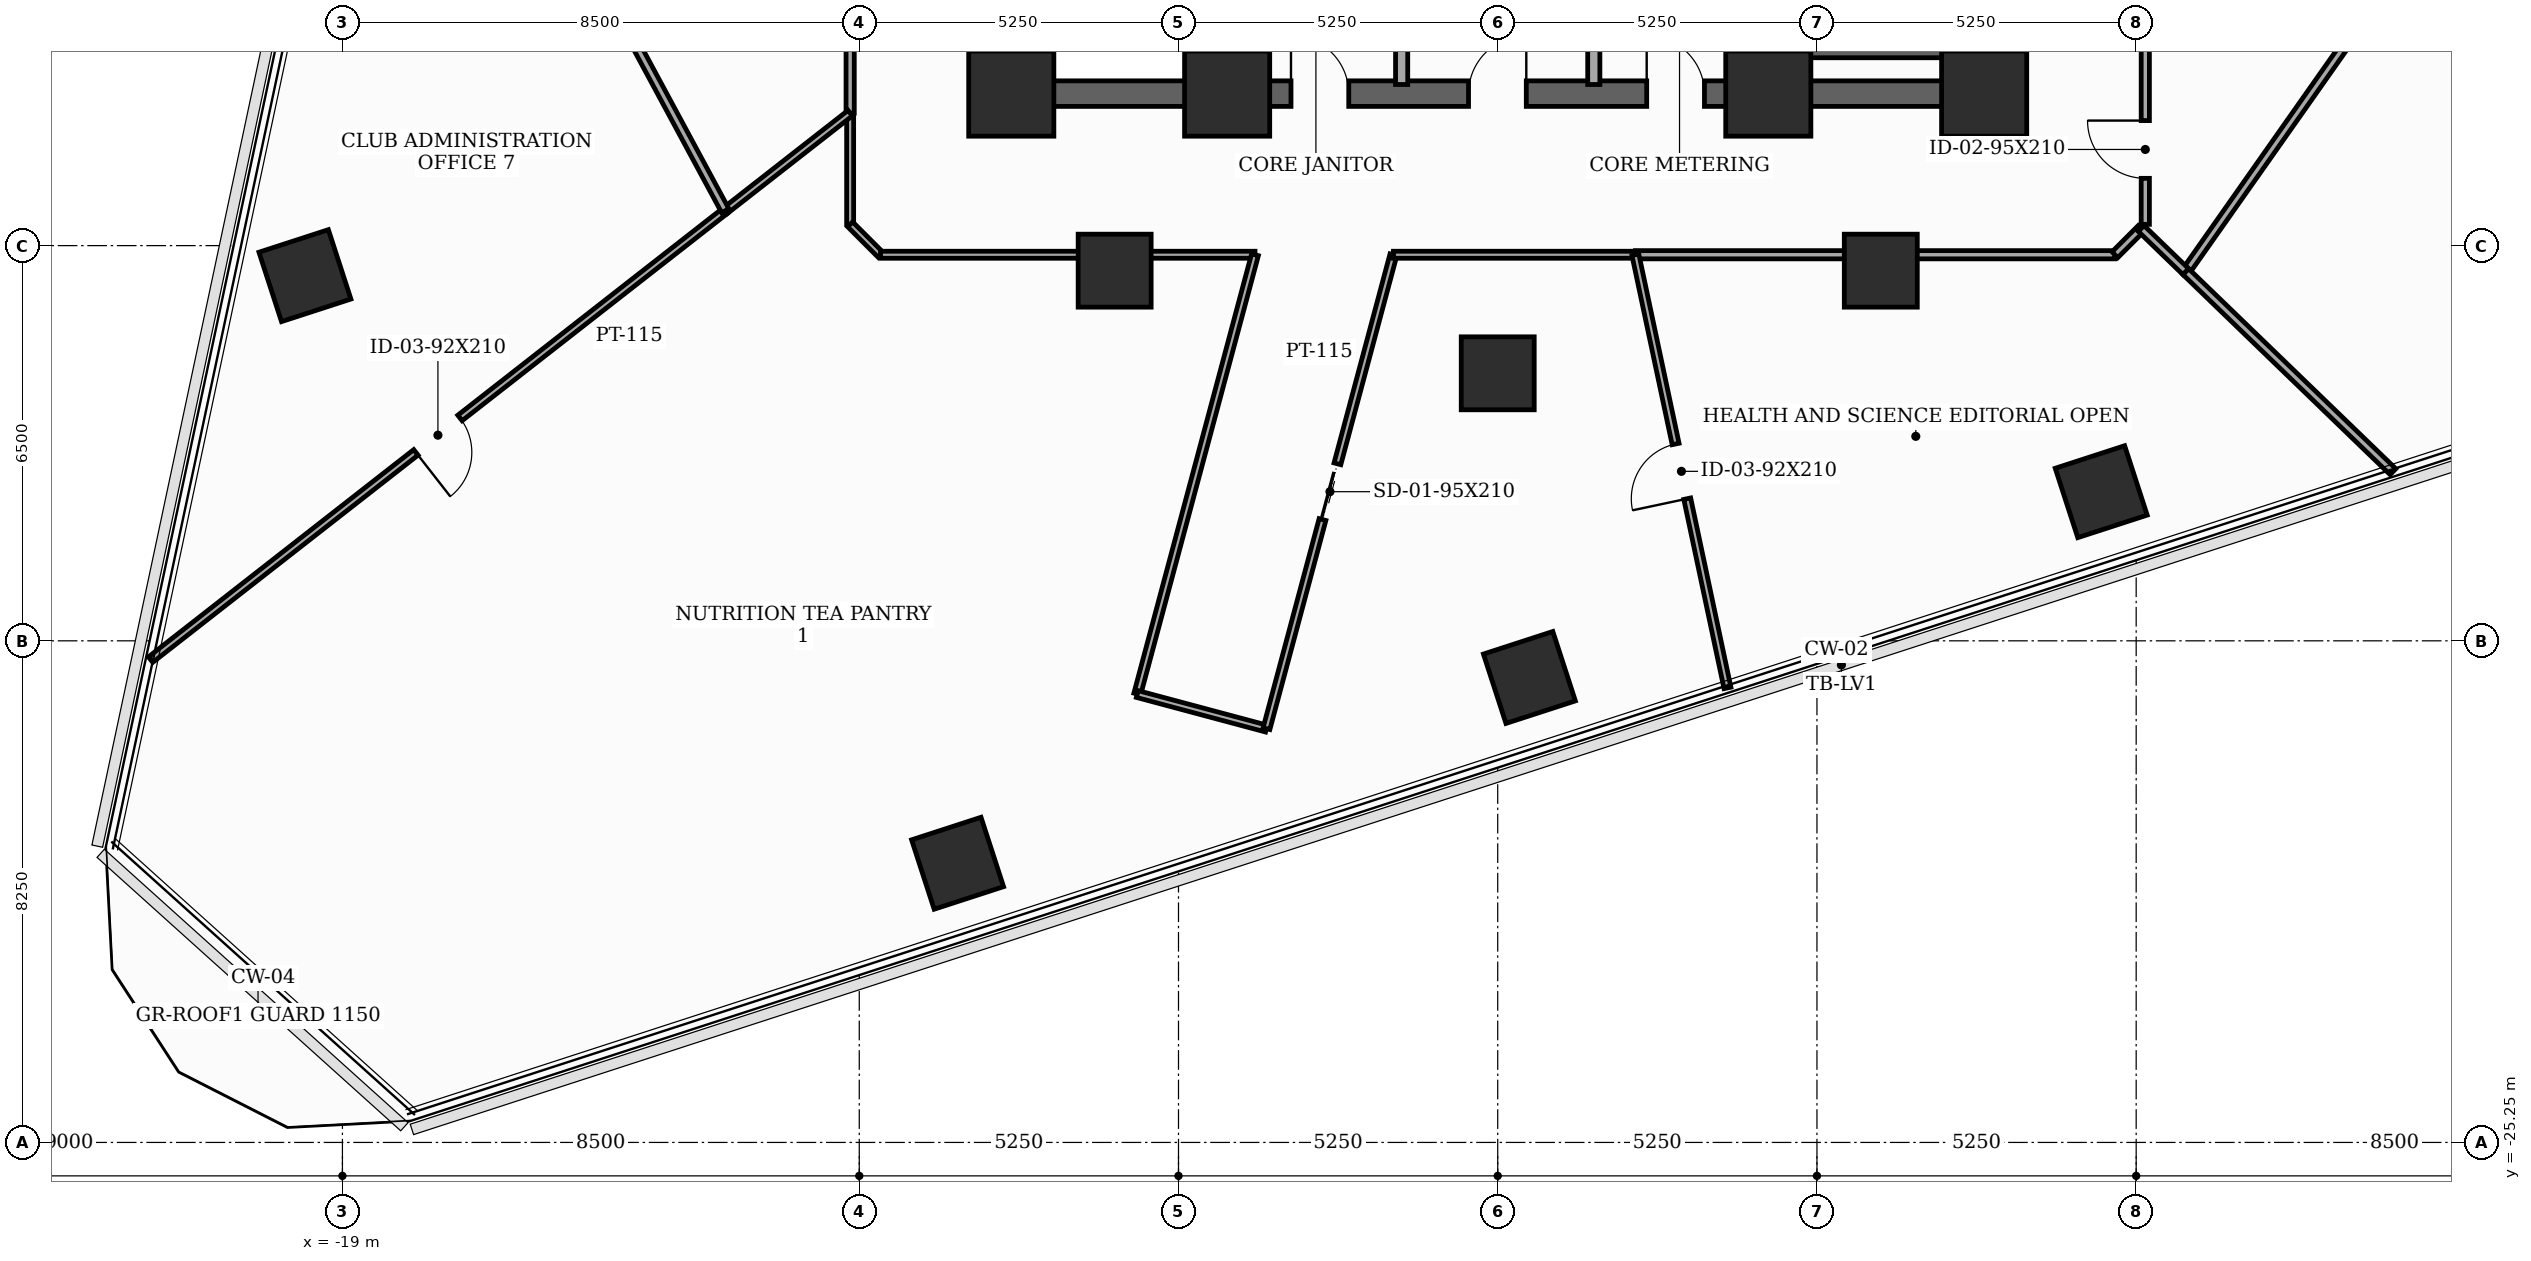
"""IFC4 building model, lengths in metres.
Left out: names, types, materials, properties, quantities, classifications, styles, units other than length and angle.
Written with IfcOpenShell. Run it as: python <this file> out.ifc"""

import sys

from ifc_helpers import new_model, si_unit, direction, frame, frame_2d, origin, origin_2d, place, context, subcontext, project, spatial, rectangle, extrude, element, fill, save


model = new_model("IFC4")
c1 = context("Model", 3, precision=1e-05, world=origin(), true_north=direction((0.0, 1.0)))
c2 = subcontext(c1, "Body", "Model", "MODEL_VIEW")
j1 = project(units=[si_unit("LENGTHUNIT", "METRE"), si_unit("PLANEANGLEUNIT", "RADIAN")], contexts=[c1])
p1 = place(None, origin())
s1 = spatial("IfcSite", under=j1, at=p1, CompositionType="ELEMENT")
p2 = place(p1, origin())
s2 = spatial("IfcBuilding", under=s1, at=p2, CompositionType="ELEMENT")
p3 = place(p2, frame((0.0, 0.0, 108.8)))
s3 = spatial("IfcBuildingStorey", under=s2, at=p3, CompositionType="ELEMENT", Elevation=108.8)
for number, where, z_axis, x_axis in (
    (1, (-8.0, -8.0, 0.0), (0.0, 0.0, 1.0), (1.0, 0.0, 0.0)),
    (2, (-4.45, -8.0, 0.0), (0.0, 0.0, 1.0), (1.0, 0.0, 0.0)),
    (3, (4.45, -8.0, 0.0), (0.0, 0.0, 1.0), (1.0, 0.0, 0.0)),
    (4, (8.0, -8.0, 0.0), (0.0, 0.0, 1.0), (1.0, 0.0, 0.0)),
):
    element("IfcColumn", number, at=place(p3, frame(where, z_axis=z_axis, x_axis=x_axis)), inside=s3, PredefinedType="COLUMN", context=c2, shape_type="SweptSolid", body=[
        extrude(rectangle(XDim=1.4, YDim=1.4, at=origin_2d()), origin(), (0.0, 0.0, 1.0), 3.7),
    ])
for number, where, z_axis, x_axis in (
    (5, (-6.3, -10.912, 0.0), (0.0, 0.0, 1.0), (1.0, 0.0, 0.0)),
    (6, (0.0, -12.6, 0.0), (0.0, 0.0, 1.0), (1.0, 0.0, 0.0)),
    (7, (6.3, -10.912, 0.0), (0.0, 0.0, 1.0), (1.0, 0.0, 0.0)),
    (8, (-8.883, -20.658, 0.0), (0.0, 0.0, 1.0), (0.951, 0.309, 0.0)),
    (9, (0.521, -17.603, 0.0), (0.0, 0.0, 1.0), (0.951, 0.309, 0.0)),
    (10, (9.925, -14.547, 0.0), (0.0, 0.0, 1.0), (0.951, 0.309, 0.0)),
    (11, (-19.616, -10.994, 0.0), (0.0, 0.0, 1.0), (0.951, 0.309, 0.0)),
):
    element("IfcColumn", number, at=place(p3, frame(where, z_axis=z_axis, x_axis=x_axis)), inside=s3, PredefinedType="COLUMN", context=c2, shape_type="SweptSolid", body=[
        extrude(rectangle(XDim=1.2, YDim=1.2, at=origin_2d()), origin(), (0.0, 0.0, 1.0), 3.7),
    ])
p4 = place(p3, frame((-8.0, -8.0, 0.0), z_axis=(0.0, 0.0, 1.0), x_axis=(0.0, 1.0, 0.0)))
e12 = element("IfcWall", 12, at=p4, inside=s3, PredefinedType="SHEAR", context=c2, shape_type="SweptSolid", body=[
    extrude(rectangle(XDim=16.0, YDim=0.42, at=frame_2d((8.0, 0.0))), origin(), (0.0, 0.0, 1.0), 3.5),
])
p5 = place(p4, frame((0.922, 0.0, 0.0)))
e13 = element("IfcOpeningElement", 13, at=p5, cuts=e12, PredefinedType="OPENING", context=c2, shape_type="SweptSolid", body=[
    extrude(rectangle(XDim=0.85, YDim=2.02, at=frame_2d((0.425, 1.01))), frame((0.0, 0.22, 0.0), z_axis=(0.0, -1.0, 0.0), x_axis=(1.0, 0.0, 0.0)), (0.0, 0.0, 1.0), 0.44),
])
p6 = place(p4, frame((5.35, 0.0, 0.0)))
e14 = element("IfcOpeningElement", 14, at=p6, cuts=e12, PredefinedType="OPENING", context=c2, shape_type="SweptSolid", body=[
    extrude(rectangle(XDim=1.05, YDim=2.15, at=frame_2d((0.525, 1.075))), frame((0.0, 0.22, 0.0), z_axis=(0.0, -1.0, 0.0), x_axis=(1.0, 0.0, 0.0)), (0.0, 0.0, 1.0), 0.44),
])
p7 = place(p3, frame((8.0, -8.0, 0.0), z_axis=(0.0, 0.0, 1.0), x_axis=(0.0, 1.0, 0.0)))
e15 = element("IfcWall", 15, at=p7, inside=s3, PredefinedType="SHEAR", context=c2, shape_type="SweptSolid", body=[
    extrude(rectangle(XDim=16.0, YDim=0.42, at=frame_2d((8.0, 0.0))), origin(), (0.0, 0.0, 1.0), 3.5),
])
p8 = place(p7, frame((9.6, 0.0, 0.0)))
e16 = element("IfcOpeningElement", 16, at=p8, cuts=e15, PredefinedType="OPENING", context=c2, shape_type="SweptSolid", body=[
    extrude(rectangle(XDim=1.05, YDim=2.15, at=frame_2d((0.525, 1.075))), frame((0.0, 0.22, 0.0), z_axis=(0.0, -1.0, 0.0), x_axis=(1.0, 0.0, 0.0)), (0.0, 0.0, 1.0), 0.44),
])
p9 = place(p7, frame((14.229, 0.0, 0.0)))
e17 = element("IfcOpeningElement", 17, at=p9, cuts=e15, PredefinedType="OPENING", context=c2, shape_type="SweptSolid", body=[
    extrude(rectangle(XDim=0.85, YDim=2.02, at=frame_2d((0.425, 1.01))), frame((0.0, 0.22, 0.0), z_axis=(0.0, -1.0, 0.0), x_axis=(1.0, 0.0, 0.0)), (0.0, 0.0, 1.0), 0.44),
])
p10 = place(p3, frame((-8.0, -8.0, 0.0), z_axis=(0.0, 0.0, 1.0), x_axis=(1.0, 0.0, 0.0)))
e18 = element("IfcWall", 18, at=p10, inside=s3, PredefinedType="SHEAR", context=c2, shape_type="SweptSolid", body=[
    extrude(rectangle(XDim=16.0, YDim=0.42, at=frame_2d((8.0, 0.0))), origin(), (0.0, 0.0, 1.0), 3.5),
])
p11 = place(p10, frame((4.6, 0.0, 0.0)))
e19 = element("IfcOpeningElement", 19, at=p11, cuts=e18, PredefinedType="OPENING", context=c2, shape_type="SweptSolid", body=[
    extrude(rectangle(XDim=0.95, YDim=2.1, at=frame_2d((0.475, 1.05))), frame((0.0, 0.22, 0.0), z_axis=(0.0, -1.0, 0.0), x_axis=(1.0, 0.0, 0.0)), (0.0, 0.0, 1.0), 0.44),
])
p12 = place(p10, frame((7.52, 0.0, 0.0)))
e20 = element("IfcOpeningElement", 20, at=p12, cuts=e18, PredefinedType="OPENING", context=c2, shape_type="SweptSolid", body=[
    extrude(rectangle(XDim=0.95, YDim=2.1, at=frame_2d((0.475, 1.05))), frame((0.0, 0.22, 0.0), z_axis=(0.0, -1.0, 0.0), x_axis=(1.0, 0.0, 0.0)), (0.0, 0.0, 1.0), 0.44),
])
p13 = place(p10, frame((10.45, 0.0, 0.0)))
e21 = element("IfcOpeningElement", 21, at=p13, cuts=e18, PredefinedType="OPENING", context=c2, shape_type="SweptSolid", body=[
    extrude(rectangle(XDim=0.95, YDim=2.1, at=frame_2d((0.475, 1.05))), frame((0.0, 0.22, 0.0), z_axis=(0.0, -1.0, 0.0), x_axis=(1.0, 0.0, 0.0)), (0.0, 0.0, 1.0), 0.44),
])
for number, where, z_axis, x_axis in (
    (22, (-4.45, -7.79, 0.0), (0.0, 0.0, 1.0), (0.0, 1.0, 0.0)),
    (23, (4.45, -7.79, 0.0), (0.0, 0.0, 1.0), (0.0, 1.0, 0.0)),
):
    element("IfcWall", number, at=place(p3, frame(where, z_axis=z_axis, x_axis=x_axis)), inside=s3, PredefinedType="SHEAR", context=c2, shape_type="SweptSolid", body=[
        extrude(rectangle(XDim=15.58, YDim=0.3, at=frame_2d((7.79, 0.0))), origin(), (0.0, 0.0, 1.0), 3.5),
    ])
p14 = place(p3, frame((4.45, -7.26, 0.0), z_axis=(0.0, 0.0, 1.0), x_axis=(1.0, 0.0, 0.0)))
e24 = element("IfcWall", 24, at=p14, inside=s3, PredefinedType="SHEAR", context=c2, shape_type="SweptSolid", body=[
    extrude(rectangle(XDim=3.55, YDim=0.3, at=frame_2d((1.775, 0.0))), origin(), (0.0, 0.0, 1.0), 3.5),
])
for number, where, z_axis, x_axis in (
    (25, (-1.58, -7.85, 0.0), (0.0, 0.0, 1.0), (0.0, 1.0, 0.0)),
    (26, (1.58, -7.85, 0.0), (0.0, 0.0, 1.0), (0.0, 1.0, 0.0)),
):
    element("IfcWall", number, at=place(p3, frame(where, z_axis=z_axis, x_axis=x_axis)), inside=s3, PredefinedType="SOLIDWALL", context=c2, shape_type="SweptSolid", body=[
        extrude(rectangle(XDim=2.95, YDim=0.2, at=frame_2d((1.475, 0.0))), origin(), (0.0, 0.0, 1.0), 2.885),
    ])
p15 = place(p3, frame((-10.65, -8.321, 0.0), z_axis=(0.0, 0.0, 1.0), x_axis=(0.0, -1.0, 0.0)))
e27 = element("IfcWall", 27, at=p15, inside=s3, PredefinedType="PARTITIONING", context=c2, shape_type="SweptSolid", body=[
    extrude(rectangle(XDim=1.829, YDim=0.115, at=frame_2d((0.915, 0.0))), origin(), (0.0, 0.0, 1.0), 3.5),
])
p16 = place(p3, frame((-10.65, -10.15, 0.0), z_axis=(0.0, 0.0, 1.0), x_axis=(0.707106781187, -0.707106781187, 0.0)))
e28 = element("IfcWall", 28, at=p16, inside=s3, PredefinedType="PARTITIONING", context=c2, shape_type="SweptSolid", body=[
    extrude(rectangle(XDim=0.707, YDim=0.115, at=frame_2d((0.354, 0.0))), origin(), (0.0, 0.0, 1.0), 3.5),
])
p17 = place(p3, frame((-10.15, -10.65, 0.0), z_axis=(0.0, 0.0, 1.0), x_axis=(1.0, 0.0, 0.0)))
e29 = element("IfcWall", 29, at=p17, inside=s3, PredefinedType="PARTITIONING", context=c2, shape_type="SweptSolid", body=[
    extrude(rectangle(XDim=6.158, YDim=0.115, at=frame_2d((3.079, 0.0))), origin(), (0.0, 0.0, 1.0), 2.785),
])
p18 = place(p3, frame((-3.992, -10.65, 0.0), z_axis=(0.0, 0.0, 1.0), x_axis=(-0.258828534142, -0.965923283659, 0.0)))
e30 = element("IfcWall", 30, at=p18, inside=s3, PredefinedType="PARTITIONING", context=c2, shape_type="SweptSolid", body=[
    extrude(rectangle(XDim=7.48, YDim=0.115, at=frame_2d((3.74, 0.0))), origin(), (0.0, 0.0, 1.0), 2.785),
])
p19 = place(p3, frame((-5.928, -17.875, 0.0), z_axis=(0.0, 0.0, 1.0), x_axis=(0.965959937537, -0.258691706618, 0.0)))
e31 = element("IfcWall", 31, at=p19, inside=s3, PredefinedType="PARTITIONING", context=c2, shape_type="SweptSolid", body=[
    extrude(rectangle(XDim=2.2, YDim=0.115, at=frame_2d((1.1, 0.0))), origin(), (0.0, 0.0, 1.0), 3.5),
])
p20 = place(p3, frame((-3.803, -18.444, 0.0), z_axis=(0.0, 0.0, 1.0), x_axis=(0.258754737882, 0.965943055062, 0.0)))
e32 = element("IfcWall", 32, at=p20, inside=s3, PredefinedType="PARTITIONING", context=c2, shape_type="SweptSolid", body=[
    extrude(rectangle(XDim=8.069, YDim=0.115, at=frame_2d((4.035, 0.0))), origin(), (0.0, 0.0, 1.0), 2.785),
])
p21 = place(p20, frame((3.559, 0.0, 0.0)))
e33 = element("IfcOpeningElement", 33, at=p21, cuts=e32, PredefinedType="OPENING", context=c2, shape_type="SweptSolid", body=[
    extrude(rectangle(XDim=0.95, YDim=2.1, at=frame_2d((0.475, 1.05))), frame((0.0, 0.067, 0.0), z_axis=(0.0, -1.0, 0.0), x_axis=(1.0, 0.0, 0.0)), (0.0, 0.0, 1.0), 0.135),
])
p22 = place(p3, frame((-1.715, -10.65, 0.0), z_axis=(0.0, 0.0, 1.0), x_axis=(1.0, 0.0, 0.0)))
e34 = element("IfcWall", 34, at=p22, inside=s3, PredefinedType="PARTITIONING", context=c2, shape_type="SweptSolid", body=[
    extrude(rectangle(XDim=3.979, YDim=0.115, at=frame_2d((1.99, 0.0))), origin(), (0.0, 0.0, 1.0), 2.785),
])
p23 = place(p3, frame((10.65, -10.15, 0.0), z_axis=(0.0, 0.0, 1.0), x_axis=(0.0, 1.0, 0.0)))
e35 = element("IfcWall", 35, at=p23, inside=s3, PredefinedType="PARTITIONING", context=c2, shape_type="SweptSolid", body=[
    extrude(rectangle(XDim=6.158, YDim=0.135, at=frame_2d((3.079, 0.0))), origin(), (0.0, 0.0, 1.0), 2.785),
])
p24 = place(p23, frame((0.757, 0.0, 0.0)))
e36 = element("IfcOpeningElement", 36, at=p24, cuts=e35, PredefinedType="OPENING", context=c2, shape_type="SweptSolid", body=[
    extrude(rectangle(XDim=0.95, YDim=2.1, at=frame_2d((0.475, 1.05))), frame((0.0, 0.077, 0.0), z_axis=(0.0, -1.0, 0.0), x_axis=(1.0, 0.0, 0.0)), (0.0, 0.0, 1.0), 0.155),
])
p25 = place(p3, frame((-10.65, -4.85, 0.0), z_axis=(0.0, 0.0, 1.0), x_axis=(0.0, -1.0, 0.0)))
e37 = element("IfcWall", 37, at=p25, inside=s3, PredefinedType="PARTITIONING", context=c2, shape_type="SweptSolid", body=[
    extrude(rectangle(XDim=3.471, YDim=0.135, at=frame_2d((1.735, 0.0))), origin(), (0.0, 0.0, 1.0), 2.785),
])
p26 = place(p3, frame((2.264, -10.65, 0.0), z_axis=(0.0, 0.0, 1.0), x_axis=(1.0, 0.0, 0.0)))
e38 = element("IfcWall", 38, at=p26, inside=s3, PredefinedType="PARTITIONING", context=c2, shape_type="SweptSolid", body=[
    extrude(rectangle(XDim=7.886, YDim=0.135, at=frame_2d((3.943, 0.0))), origin(), (0.0, 0.0, 1.0), 2.785),
])
p27 = place(p3, frame((10.15, -10.65, 0.0), z_axis=(0.0, 0.0, 1.0), x_axis=(0.70730655707, 0.706906948845, 0.0)))
e39 = element("IfcWall", 39, at=p27, inside=s3, PredefinedType="PARTITIONING", context=c2, shape_type="SweptSolid", body=[
    extrude(rectangle(XDim=0.611, YDim=0.135, at=frame_2d((0.305, 0.0))), origin(), (0.0, 0.0, 1.0), 3.5),
])
p28 = place(p3, frame((-10.65, -8.321, 0.0), z_axis=(0.0, 0.0, 1.0), x_axis=(-0.787998815749, -0.615676754782, 0.0)))
e40 = element("IfcWall", 40, at=p28, inside=s3, PredefinedType="PARTITIONING", context=c2, shape_type="SweptSolid", body=[
    extrude(rectangle(XDim=2.607, YDim=0.115, at=frame_2d((1.303, 0.0))), origin(), (0.0, 0.0, 1.0), 3.5),
])
p29 = place(p3, frame((-12.704, -9.926, 0.0), z_axis=(0.0, 0.0, 1.0), x_axis=(-0.788033940978, -0.615631795692, 0.0)))
e41 = element("IfcWall", 41, at=p29, inside=s3, PredefinedType="PARTITIONING", context=c2, shape_type="SweptSolid", body=[
    extrude(rectangle(XDim=11.993, YDim=0.115, at=frame_2d((5.997, 0.0))), origin(), (0.0, 0.0, 1.0), 2.935),
])
p30 = place(p29, frame((5.537, 0.0, 0.0)))
e42 = element("IfcOpeningElement", 42, at=p30, cuts=e41, PredefinedType="OPENING", context=c2, shape_type="SweptSolid", body=[
    extrude(rectangle(XDim=0.92, YDim=2.1, at=frame_2d((0.46, 1.05))), frame((0.0, 0.067, 0.0), z_axis=(0.0, -1.0, 0.0), x_axis=(1.0, 0.0, 0.0)), (0.0, 0.0, 1.0), 0.135),
])
p31 = place(p3, frame((3.778, -17.774, 0.0), z_axis=(0.0, 0.0, 1.0), x_axis=(-0.207917284361, 0.978146411773, 0.0)))
e43 = element("IfcWall", 43, at=p31, inside=s3, PredefinedType="PARTITIONING", context=c2, shape_type="SweptSolid", body=[
    extrude(rectangle(XDim=7.284, YDim=0.115, at=frame_2d((3.642, 0.0))), origin(), (0.0, 0.0, 1.0), 2.785),
])
p32 = place(p31, frame((3.182, 0.0, 0.0)))
e44 = element("IfcOpeningElement", 44, at=p32, cuts=e43, PredefinedType="OPENING", context=c2, shape_type="SweptSolid", body=[
    extrude(rectangle(XDim=0.92, YDim=2.1, at=frame_2d((0.46, 1.05))), frame((0.0, 0.067, 0.0), z_axis=(0.0, -1.0, 0.0), x_axis=(1.0, 0.0, 0.0)), (0.0, 0.0, 1.0), 0.135),
])
p33 = place(p3, frame((14.349, -6.615, 0.0), z_axis=(0.0, 0.0, 1.0), x_axis=(-0.575468172254, -0.817824175922, 0.0)))
e45 = element("IfcWall", 45, at=p33, inside=s3, PredefinedType="PARTITIONING", context=c2, shape_type="SweptSolid", body=[
    extrude(rectangle(XDim=5.272, YDim=0.135, at=frame_2d((2.636, 0.0))), origin(), (0.0, 0.0, 1.0), 2.785),
])
p34 = place(p3, frame((11.315, -10.927, 0.0), z_axis=(0.0, 0.0, 1.0), x_axis=(0.719365057957, -0.694632214478, 0.0)))
e46 = element("IfcWall", 46, at=p34, inside=s3, PredefinedType="PARTITIONING", context=c2, shape_type="SweptSolid", body=[
    extrude(rectangle(XDim=4.738, YDim=0.135, at=frame_2d((2.369, 0.0))), origin(), (0.0, 0.0, 1.0), 2.935),
])
p35 = place(p3, frame((10.582, -10.218, 0.0), z_axis=(0.0, 0.0, 1.0), x_axis=(0.718741071219, -0.695277838381, 0.0)))
e47 = element("IfcWall", 47, at=p35, inside=s3, PredefinedType="PARTITIONING", context=c2, shape_type="SweptSolid", body=[
    extrude(rectangle(XDim=1.02, YDim=0.135, at=frame_2d((0.51, 0.0))), origin(), (0.0, 0.0, 1.0), 3.5),
])
p36 = place(p3, frame((-15.478, -4.781, 0.0), z_axis=(0.0, 0.0, 1.0), x_axis=(0.47456801742, -0.880218834633, 0.0)))
e48 = element("IfcWall", 48, at=p36, inside=s3, PredefinedType="PARTITIONING", context=c2, shape_type="SweptSolid", body=[
    extrude(rectangle(XDim=5.845, YDim=0.135, at=frame_2d((2.923, 0.0))), origin(), (0.0, 0.0, 1.0), 2.785),
])
p37 = place(p11, origin())
e49 = element("IfcDoor", 49, at=p37, inside=s3, OperationType="SINGLE_SWING_LEFT", PredefinedType="DOOR", context=c2, shape_type="SweptSolid", body=[
    extrude(rectangle(XDim=0.95, YDim=2.1, at=frame_2d((0.475, 1.05))), frame((0.0, 0.025, 0.0), z_axis=(0.0, -1.0, 0.0), x_axis=(1.0, 0.0, 0.0)), (0.0, 0.0, 1.0), 0.05),
])
fill(e19, e49)
p38 = place(p12, origin())
e50 = element("IfcDoor", 50, at=p38, inside=s3, OperationType="SINGLE_SWING_RIGHT", PredefinedType="DOOR", context=c2, shape_type="SweptSolid", body=[
    extrude(rectangle(XDim=0.95, YDim=2.1, at=frame_2d((0.475, 1.05))), frame((0.0, 0.025, 0.0), z_axis=(0.0, -1.0, 0.0), x_axis=(1.0, 0.0, 0.0)), (0.0, 0.0, 1.0), 0.05),
])
fill(e20, e50)
p39 = place(p13, origin())
e51 = element("IfcDoor", 51, at=p39, inside=s3, OperationType="SINGLE_SWING_LEFT", PredefinedType="DOOR", context=c2, shape_type="SweptSolid", body=[
    extrude(rectangle(XDim=0.95, YDim=2.1, at=frame_2d((0.475, 1.05))), frame((0.0, 0.025, 0.0), z_axis=(0.0, -1.0, 0.0), x_axis=(1.0, 0.0, 0.0)), (0.0, 0.0, 1.0), 0.05),
])
fill(e21, e51)
p40 = place(p21, origin())
e52 = element("IfcDoor", 52, at=p40, inside=s3, OperationType="SLIDING_TO_LEFT", PredefinedType="DOOR", context=c2, shape_type="SweptSolid", body=[
    extrude(rectangle(XDim=0.95, YDim=2.1, at=frame_2d((0.475, 1.05))), frame((0.0, 0.025, 0.0), z_axis=(0.0, -1.0, 0.0), x_axis=(1.0, 0.0, 0.0)), (0.0, 0.0, 1.0), 0.05),
])
fill(e33, e52)
p41 = place(p24, origin())
e53 = element("IfcDoor", 53, at=p41, inside=s3, OperationType="SINGLE_SWING_RIGHT", PredefinedType="DOOR", context=c2, shape_type="SweptSolid", body=[
    extrude(rectangle(XDim=0.95, YDim=2.1, at=frame_2d((0.475, 1.05))), frame((0.0, 0.025, 0.0), z_axis=(0.0, -1.0, 0.0), x_axis=(1.0, 0.0, 0.0)), (0.0, 0.0, 1.0), 0.05),
])
fill(e36, e53)
p42 = place(p30, origin())
e54 = element("IfcDoor", 54, at=p42, inside=s3, OperationType="SINGLE_SWING_RIGHT", PredefinedType="DOOR", context=c2, shape_type="SweptSolid", body=[
    extrude(rectangle(XDim=0.92, YDim=2.1, at=frame_2d((0.46, 1.05))), frame((0.0, 0.025, 0.0), z_axis=(0.0, -1.0, 0.0), x_axis=(1.0, 0.0, 0.0)), (0.0, 0.0, 1.0), 0.05),
])
fill(e42, e54)
p43 = place(p32, origin())
e55 = element("IfcDoor", 55, at=p43, inside=s3, OperationType="SINGLE_SWING_LEFT", PredefinedType="DOOR", context=c2, shape_type="SweptSolid", body=[
    extrude(rectangle(XDim=0.92, YDim=2.1, at=frame_2d((0.46, 1.05))), frame((0.0, 0.025, 0.0), z_axis=(0.0, -1.0, 0.0), x_axis=(1.0, 0.0, 0.0)), (0.0, 0.0, 1.0), 0.05),
])
fill(e44, e55)
save(model, sys.argv[1])
